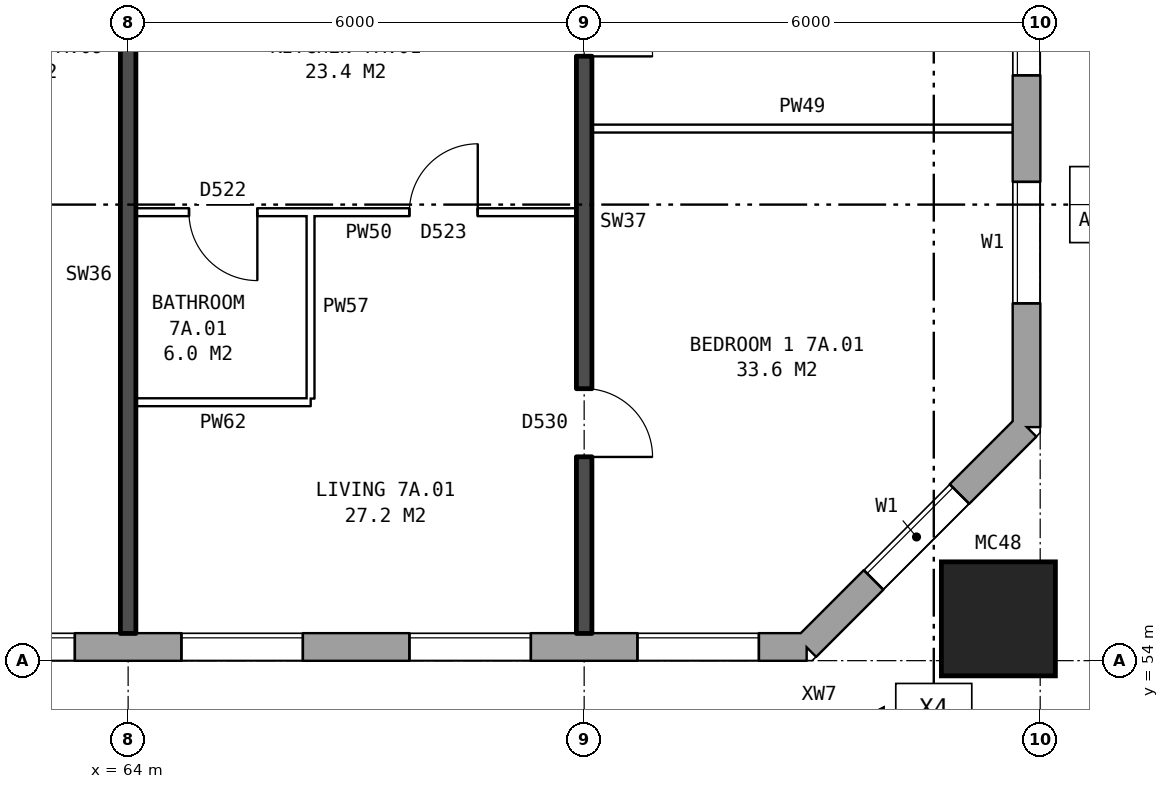
"""IFC4 building model, lengths in metres.
Left out: names, types, materials, properties, quantities, classifications, styles, units other than length and angle.
Written with IfcOpenShell. Run it as: python <this file> out.ifc"""

import sys

from ifc_helpers import new_model, si_unit, direction, frame, frame_2d, origin, origin_2d, place, context, subcontext, project, spatial, rectangle, hollow_rectangle, extrude, element, fill, save


model = new_model("IFC4")
c1 = context("Model", 3, precision=1e-05, world=origin(), true_north=direction((0.0, 1.0)))
c2 = subcontext(c1, "Body", "Model", "MODEL_VIEW")
j1 = project(units=[si_unit("LENGTHUNIT", "METRE"), si_unit("PLANEANGLEUNIT", "RADIAN")], contexts=[c1])
p1 = place(None, origin())
s1 = spatial("IfcSite", under=j1, at=p1, CompositionType="ELEMENT")
p2 = place(p1, origin())
s2 = spatial("IfcBuilding", under=s1, at=p2, CompositionType="ELEMENT")
p3 = place(p2, frame((0.0, 0.0, 28.8)))
s3 = spatial("IfcBuildingStorey", under=s2, at=p3, CompositionType="ELEMENT", Elevation=28.8)
p4 = place(p3, frame((75.45, 54.55, 0.0), z_axis=(0.0, 0.0, 1.0), x_axis=(1.0, 0.0, 0.0)))
e1 = element("IfcColumn", 1, at=p4, inside=s3, PredefinedType="COLUMN", context=c2, shape_type="SweptSolid", body=[
    extrude(hollow_rectangle(XDim=1.5, YDim=1.5, WallThickness=0.08, at=origin_2d()), origin(), (0.0, 0.0, 1.0), 3.1),
])
p5 = place(p3, frame((22.825, 54.18, 0.0), z_axis=(0.0, 0.0, 1.0), x_axis=(1.0, 0.0, 0.0)))
e2 = element("IfcWall", 2, at=p5, inside=s3, PredefinedType="STANDARD", context=c2, shape_type="SweptSolid", body=[
    extrude(rectangle(XDim=50.101, YDim=0.36, at=frame_2d((25.05, 0.0))), origin(), (0.0, 0.0, 1.0), 2.85),
])
p6 = place(p5, frame((2.875, 0.0, 0.8)))
e3 = element("IfcOpeningElement", 3, at=p6, cuts=e2, PredefinedType="OPENING", context=c2, shape_type="SweptSolid", body=[
    extrude(rectangle(XDim=1.6, YDim=1.8, at=frame_2d((0.8, 0.9))), frame((0.0, 0.19, 0.0), z_axis=(0.0, -1.0, 0.0), x_axis=(1.0, 0.0, 0.0)), (0.0, 0.0, 1.0), 0.38),
])
p7 = place(p5, frame((5.875, 0.0, 0.8)))
e4 = element("IfcOpeningElement", 4, at=p7, cuts=e2, PredefinedType="OPENING", context=c2, shape_type="SweptSolid", body=[
    extrude(rectangle(XDim=1.6, YDim=1.8, at=frame_2d((0.8, 0.9))), frame((0.0, 0.19, 0.0), z_axis=(0.0, -1.0, 0.0), x_axis=(1.0, 0.0, 0.0)), (0.0, 0.0, 1.0), 0.38),
])
p8 = place(p5, frame((8.875, 0.0, 0.8)))
e5 = element("IfcOpeningElement", 5, at=p8, cuts=e2, PredefinedType="OPENING", context=c2, shape_type="SweptSolid", body=[
    extrude(rectangle(XDim=1.6, YDim=1.8, at=frame_2d((0.8, 0.9))), frame((0.0, 0.19, 0.0), z_axis=(0.0, -1.0, 0.0), x_axis=(1.0, 0.0, 0.0)), (0.0, 0.0, 1.0), 0.38),
])
p9 = place(p5, frame((11.375, 0.0, 1.0)))
e6 = element("IfcOpeningElement", 6, at=p9, cuts=e2, PredefinedType="OPENING", context=c2, shape_type="SweptSolid", body=[
    extrude(rectangle(XDim=1.0, YDim=1.5, at=frame_2d((0.5, 0.75))), frame((0.0, 0.19, 0.0), z_axis=(0.0, -1.0, 0.0), x_axis=(1.0, 0.0, 0.0)), (0.0, 0.0, 1.0), 0.38),
])
p10 = place(p5, frame((12.675, 0.0, 1.6)))
e7 = element("IfcOpeningElement", 7, at=p10, cuts=e2, PredefinedType="OPENING", context=c2, shape_type="SweptSolid", body=[
    extrude(rectangle(XDim=0.6, YDim=0.9, at=frame_2d((0.3, 0.45))), frame((0.0, 0.19, 0.0), z_axis=(0.0, -1.0, 0.0), x_axis=(1.0, 0.0, 0.0)), (0.0, 0.0, 1.0), 0.38),
])
p11 = place(p5, frame((17.875, 0.0, 0.8)))
e8 = element("IfcOpeningElement", 8, at=p11, cuts=e2, PredefinedType="OPENING", context=c2, shape_type="SweptSolid", body=[
    extrude(rectangle(XDim=1.6, YDim=1.8, at=frame_2d((0.8, 0.9))), frame((0.0, 0.19, 0.0), z_axis=(0.0, -1.0, 0.0), x_axis=(1.0, 0.0, 0.0)), (0.0, 0.0, 1.0), 0.38),
])
p12 = place(p5, frame((20.875, 0.0, 0.8)))
e9 = element("IfcOpeningElement", 9, at=p12, cuts=e2, PredefinedType="OPENING", context=c2, shape_type="SweptSolid", body=[
    extrude(rectangle(XDim=1.6, YDim=1.8, at=frame_2d((0.8, 0.9))), frame((0.0, 0.19, 0.0), z_axis=(0.0, -1.0, 0.0), x_axis=(1.0, 0.0, 0.0)), (0.0, 0.0, 1.0), 0.38),
])
p13 = place(p5, frame((23.875, 0.0, 0.8)))
e10 = element("IfcOpeningElement", 10, at=p13, cuts=e2, PredefinedType="OPENING", context=c2, shape_type="SweptSolid", body=[
    extrude(rectangle(XDim=1.6, YDim=1.8, at=frame_2d((0.8, 0.9))), frame((0.0, 0.19, 0.0), z_axis=(0.0, -1.0, 0.0), x_axis=(1.0, 0.0, 0.0)), (0.0, 0.0, 1.0), 0.38),
])
p14 = place(p5, frame((26.875, 0.0, 0.8)))
e11 = element("IfcOpeningElement", 11, at=p14, cuts=e2, PredefinedType="OPENING", context=c2, shape_type="SweptSolid", body=[
    extrude(rectangle(XDim=1.6, YDim=1.8, at=frame_2d((0.8, 0.9))), frame((0.0, 0.19, 0.0), z_axis=(0.0, -1.0, 0.0), x_axis=(1.0, 0.0, 0.0)), (0.0, 0.0, 1.0), 0.38),
])
p15 = place(p5, frame((29.875, 0.0, 0.8)))
e12 = element("IfcOpeningElement", 12, at=p15, cuts=e2, PredefinedType="OPENING", context=c2, shape_type="SweptSolid", body=[
    extrude(rectangle(XDim=1.6, YDim=1.8, at=frame_2d((0.8, 0.9))), frame((0.0, 0.19, 0.0), z_axis=(0.0, -1.0, 0.0), x_axis=(1.0, 0.0, 0.0)), (0.0, 0.0, 1.0), 0.38),
])
p16 = place(p5, frame((32.375, 0.0, 0.8)))
e13 = element("IfcOpeningElement", 13, at=p16, cuts=e2, PredefinedType="OPENING", context=c2, shape_type="SweptSolid", body=[
    extrude(rectangle(XDim=1.4, YDim=1.8, at=frame_2d((0.7, 0.9))), frame((0.0, 0.19, 0.0), z_axis=(0.0, -1.0, 0.0), x_axis=(1.0, 0.0, 0.0)), (0.0, 0.0, 1.0), 0.38),
])
p17 = place(p5, frame((35.375, 0.0, 0.15)))
e14 = element("IfcOpeningElement", 14, at=p17, cuts=e2, PredefinedType="OPENING", context=c2, shape_type="SweptSolid", body=[
    extrude(rectangle(XDim=0.8, YDim=0.9, at=frame_2d((0.4, 0.45))), frame((0.0, 0.19, 0.0), z_axis=(0.0, -1.0, 0.0), x_axis=(1.0, 0.0, 0.0)), (0.0, 0.0, 1.0), 0.38),
])
p18 = place(p5, frame((38.875, 0.0, 0.8)))
e15 = element("IfcOpeningElement", 15, at=p18, cuts=e2, PredefinedType="OPENING", context=c2, shape_type="SweptSolid", body=[
    extrude(rectangle(XDim=1.6, YDim=1.8, at=frame_2d((0.8, 0.9))), frame((0.0, 0.19, 0.0), z_axis=(0.0, -1.0, 0.0), x_axis=(1.0, 0.0, 0.0)), (0.0, 0.0, 1.0), 0.38),
])
p19 = place(p5, frame((41.875, 0.0, 0.8)))
e16 = element("IfcOpeningElement", 16, at=p19, cuts=e2, PredefinedType="OPENING", context=c2, shape_type="SweptSolid", body=[
    extrude(rectangle(XDim=1.6, YDim=1.8, at=frame_2d((0.8, 0.9))), frame((0.0, 0.19, 0.0), z_axis=(0.0, -1.0, 0.0), x_axis=(1.0, 0.0, 0.0)), (0.0, 0.0, 1.0), 0.38),
])
p20 = place(p5, frame((44.875, 0.0, 0.8)))
e17 = element("IfcOpeningElement", 17, at=p20, cuts=e2, PredefinedType="OPENING", context=c2, shape_type="SweptSolid", body=[
    extrude(rectangle(XDim=1.6, YDim=1.8, at=frame_2d((0.8, 0.9))), frame((0.0, 0.19, 0.0), z_axis=(0.0, -1.0, 0.0), x_axis=(1.0, 0.0, 0.0)), (0.0, 0.0, 1.0), 0.38),
])
p21 = place(p5, frame((47.875, 0.0, 0.8)))
e18 = element("IfcOpeningElement", 18, at=p21, cuts=e2, PredefinedType="OPENING", context=c2, shape_type="SweptSolid", body=[
    extrude(rectangle(XDim=1.6, YDim=1.8, at=frame_2d((0.8, 0.9))), frame((0.0, 0.19, 0.0), z_axis=(0.0, -1.0, 0.0), x_axis=(1.0, 0.0, 0.0)), (0.0, 0.0, 1.0), 0.38),
])
p22 = place(p5, frame((14.825, 0.0, 0.8)))
e19 = element("IfcOpeningElement", 19, at=p22, cuts=e2, PredefinedType="OPENING", context=c2, shape_type="SweptSolid", body=[
    extrude(rectangle(XDim=0.6, YDim=0.9, at=frame_2d((0.3, 0.45))), frame((0.0, 0.19, 0.0), z_axis=(0.0, -1.0, 0.0), x_axis=(1.0, 0.0, 0.0)), (0.0, 0.0, 1.0), 0.38),
])
p23 = place(p5, frame((15.775, 0.0, 0.8)))
e20 = element("IfcOpeningElement", 20, at=p23, cuts=e2, PredefinedType="OPENING", context=c2, shape_type="SweptSolid", body=[
    extrude(rectangle(XDim=1.2, YDim=1.5, at=frame_2d((0.6, 0.75))), frame((0.0, 0.19, 0.0), z_axis=(0.0, -1.0, 0.0), x_axis=(1.0, 0.0, 0.0)), (0.0, 0.0, 1.0), 0.38),
])
p24 = place(p5, frame((34.075, 0.0, 0.8)))
e21 = element("IfcOpeningElement", 21, at=p24, cuts=e2, PredefinedType="OPENING", context=c2, shape_type="SweptSolid", body=[
    extrude(rectangle(XDim=0.6, YDim=1.2, at=frame_2d((0.3, 0.6))), frame((0.0, 0.19, 0.0), z_axis=(0.0, -1.0, 0.0), x_axis=(1.0, 0.0, 0.0)), (0.0, 0.0, 1.0), 0.38),
])
p25 = place(p5, frame((36.725, 0.0, 1.65)))
e22 = element("IfcOpeningElement", 22, at=p25, cuts=e2, PredefinedType="OPENING", context=c2, shape_type="SweptSolid", body=[
    extrude(rectangle(XDim=1.2, YDim=0.9, at=frame_2d((0.6, 0.45))), frame((0.0, 0.19, 0.0), z_axis=(0.0, -1.0, 0.0), x_axis=(1.0, 0.0, 0.0)), (0.0, 0.0, 1.0), 0.38),
])
p26 = place(p3, frame((72.925, 54.18, 0.0), z_axis=(0.0, 0.0, 1.0), x_axis=(0.707106781187, 0.707106781187, 0.0)))
e23 = element("IfcWall", 23, at=p26, inside=s3, PredefinedType="STANDARD", context=c2, shape_type="SweptSolid", body=[
    extrude(rectangle(XDim=4.094, YDim=0.36, at=frame_2d((2.047, 0.0))), origin(), (0.0, 0.0, 1.0), 2.85),
])
p27 = place(p26, frame((1.247, 0.0, 0.8)))
e24 = element("IfcOpeningElement", 24, at=p27, cuts=e23, PredefinedType="OPENING", context=c2, shape_type="SweptSolid", body=[
    extrude(rectangle(XDim=1.6, YDim=1.8, at=frame_2d((0.8, 0.9))), frame((0.0, 0.19, 0.0), z_axis=(0.0, -1.0, 0.0), x_axis=(1.0, 0.0, 0.0)), (0.0, 0.0, 1.0), 0.38),
])
p28 = place(p3, frame((75.82, 57.075, 0.0), z_axis=(0.0, 0.0, 1.0), x_axis=(0.0, 1.0, 0.0)))
e25 = element("IfcWall", 25, at=p28, inside=s3, PredefinedType="STANDARD", context=c2, shape_type="SweptSolid", body=[
    extrude(rectangle(XDim=25.851, YDim=0.36, at=frame_2d((12.925, 0.0))), origin(), (0.0, 0.0, 1.0), 2.85),
])
p29 = place(p28, frame((1.625, 0.0, 0.8)))
e26 = element("IfcOpeningElement", 26, at=p29, cuts=e25, PredefinedType="OPENING", context=c2, shape_type="SweptSolid", body=[
    extrude(rectangle(XDim=1.6, YDim=1.8, at=frame_2d((0.8, 0.9))), frame((0.0, 0.19, 0.0), z_axis=(0.0, -1.0, 0.0), x_axis=(1.0, 0.0, 0.0)), (0.0, 0.0, 1.0), 0.38),
])
p30 = place(p28, frame((4.625, 0.0, 0.8)))
e27 = element("IfcOpeningElement", 27, at=p30, cuts=e25, PredefinedType="OPENING", context=c2, shape_type="SweptSolid", body=[
    extrude(rectangle(XDim=1.6, YDim=1.8, at=frame_2d((0.8, 0.9))), frame((0.0, 0.19, 0.0), z_axis=(0.0, -1.0, 0.0), x_axis=(1.0, 0.0, 0.0)), (0.0, 0.0, 1.0), 0.38),
])
p31 = place(p28, frame((19.625, 0.0, 0.8)))
e28 = element("IfcOpeningElement", 28, at=p31, cuts=e25, PredefinedType="OPENING", context=c2, shape_type="SweptSolid", body=[
    extrude(rectangle(XDim=1.6, YDim=1.8, at=frame_2d((0.8, 0.9))), frame((0.0, 0.19, 0.0), z_axis=(0.0, -1.0, 0.0), x_axis=(1.0, 0.0, 0.0)), (0.0, 0.0, 1.0), 0.38),
])
p32 = place(p28, frame((22.625, 0.0, 0.8)))
e29 = element("IfcOpeningElement", 29, at=p32, cuts=e25, PredefinedType="OPENING", context=c2, shape_type="SweptSolid", body=[
    extrude(rectangle(XDim=1.6, YDim=1.8, at=frame_2d((0.8, 0.9))), frame((0.0, 0.19, 0.0), z_axis=(0.0, -1.0, 0.0), x_axis=(1.0, 0.0, 0.0)), (0.0, 0.0, 1.0), 0.38),
])
p33 = place(p3, frame((64.1, 57.4, 0.0), z_axis=(0.0, 0.0, 1.0), x_axis=(1.0, 0.0, 0.0)))
e30 = element("IfcWall", 30, at=p33, inside=s3, PredefinedType="PARTITIONING", context=c2, shape_type="SweptSolid", body=[
    extrude(rectangle(XDim=2.3, YDim=0.1, at=frame_2d((1.15, 0.0))), origin(), (0.0, 0.0, 1.0), 2.85),
])
p34 = place(p3, frame((64.1, 59.9, 0.0), z_axis=(0.0, 0.0, 1.0), x_axis=(1.0, 0.0, 0.0)))
e31 = element("IfcWall", 31, at=p34, inside=s3, PredefinedType="PARTITIONING", context=c2, shape_type="SweptSolid", body=[
    extrude(rectangle(XDim=5.8, YDim=0.1, at=frame_2d((2.9, 0.0))), origin(), (0.0, 0.0, 1.0), 2.85),
])
p35 = place(p34, frame((3.6, 0.0, 0.0)))
e32 = element("IfcOpeningElement", 32, at=p35, cuts=e31, PredefinedType="OPENING", context=c2, shape_type="SweptSolid", body=[
    extrude(rectangle(XDim=0.9, YDim=2.1, at=frame_2d((0.45, 1.05))), frame((0.0, 0.06, 0.0), z_axis=(0.0, -1.0, 0.0), x_axis=(1.0, 0.0, 0.0)), (0.0, 0.0, 1.0), 0.12),
])
p36 = place(p34, frame((0.7, 0.0, 0.0)))
e33 = element("IfcOpeningElement", 33, at=p36, cuts=e31, PredefinedType="OPENING", context=c2, shape_type="SweptSolid", body=[
    extrude(rectangle(XDim=0.9, YDim=2.1, at=frame_2d((0.45, 1.05))), frame((0.0, 0.06, 0.0), z_axis=(0.0, -1.0, 0.0), x_axis=(1.0, 0.0, 0.0)), (0.0, 0.0, 1.0), 0.12),
])
p37 = place(p3, frame((70.1, 61.0, 0.0), z_axis=(0.0, 0.0, 1.0), x_axis=(1.0, 0.0, 0.0)))
e34 = element("IfcWall", 34, at=p37, inside=s3, PredefinedType="PARTITIONING", context=c2, shape_type="SweptSolid", body=[
    extrude(rectangle(XDim=5.54, YDim=0.1, at=frame_2d((2.77, 0.0))), origin(), (0.0, 0.0, 1.0), 2.85),
])
p38 = place(p3, frame((64.0, 54.36, 0.0), z_axis=(0.0, 0.0, 1.0), x_axis=(0.0, 1.0, 0.0)))
e35 = element("IfcWall", 35, at=p38, inside=s3, PredefinedType="SOLIDWALL", context=c2, shape_type="SweptSolid", body=[
    extrude(rectangle(XDim=9.44, YDim=0.2, at=frame_2d((4.72, 0.0))), origin(), (0.0, 0.0, 1.0), 2.85),
])
p39 = place(p3, frame((66.4, 57.45, 0.0), z_axis=(0.0, 0.0, 1.0), x_axis=(0.0, 1.0, 0.0)))
e36 = element("IfcWall", 36, at=p39, inside=s3, PredefinedType="PARTITIONING", context=c2, shape_type="SweptSolid", body=[
    extrude(rectangle(XDim=2.4, YDim=0.1, at=frame_2d((1.2, 0.0))), origin(), (0.0, 0.0, 1.0), 2.85),
])
p40 = place(p3, frame((70.0, 54.36, 0.0), z_axis=(0.0, 0.0, 1.0), x_axis=(0.0, 1.0, 0.0)))
e37 = element("IfcWall", 37, at=p40, inside=s3, PredefinedType="SOLIDWALL", context=c2, shape_type="SweptSolid", body=[
    extrude(rectangle(XDim=9.44, YDim=0.2, at=frame_2d((4.72, 0.0))), origin(), (0.0, 0.0, 1.0), 2.85),
])
p41 = place(p40, frame((2.32, 0.0, 0.0)))
e38 = element("IfcOpeningElement", 38, at=p41, cuts=e37, PredefinedType="OPENING", context=c2, shape_type="SweptSolid", body=[
    extrude(rectangle(XDim=0.9, YDim=2.1, at=frame_2d((0.45, 1.05))), frame((0.0, 0.11, 0.0), z_axis=(0.0, -1.0, 0.0), x_axis=(1.0, 0.0, 0.0)), (0.0, 0.0, 1.0), 0.22),
])
p42 = place(p40, frame((7.59, 0.0, 0.0)))
e39 = element("IfcOpeningElement", 39, at=p42, cuts=e37, PredefinedType="OPENING", context=c2, shape_type="SweptSolid", body=[
    extrude(rectangle(XDim=0.9, YDim=2.1, at=frame_2d((0.45, 1.05))), frame((0.0, 0.11, 0.0), z_axis=(0.0, -1.0, 0.0), x_axis=(1.0, 0.0, 0.0)), (0.0, 0.0, 1.0), 0.22),
])
p43 = place(p18, origin())
e40 = element("IfcWindow", 40, at=p43, inside=s3, PartitioningType="SINGLE_PANEL", PredefinedType="WINDOW", context=c2, shape_type="SweptSolid", body=[
    extrude(rectangle(XDim=1.6, YDim=1.8, at=frame_2d((0.8, 0.9))), frame((0.0, 0.15, 0.0), z_axis=(0.0, -1.0, 0.0), x_axis=(1.0, 0.0, 0.0)), (0.0, 0.0, 1.0), 0.06),
])
fill(e15, e40)
p44 = place(p19, origin())
e41 = element("IfcWindow", 41, at=p44, inside=s3, PartitioningType="SINGLE_PANEL", PredefinedType="WINDOW", context=c2, shape_type="SweptSolid", body=[
    extrude(rectangle(XDim=1.6, YDim=1.8, at=frame_2d((0.8, 0.9))), frame((0.0, 0.15, 0.0), z_axis=(0.0, -1.0, 0.0), x_axis=(1.0, 0.0, 0.0)), (0.0, 0.0, 1.0), 0.06),
])
fill(e16, e41)
p45 = place(p20, origin())
e42 = element("IfcWindow", 42, at=p45, inside=s3, PartitioningType="SINGLE_PANEL", PredefinedType="WINDOW", context=c2, shape_type="SweptSolid", body=[
    extrude(rectangle(XDim=1.6, YDim=1.8, at=frame_2d((0.8, 0.9))), frame((0.0, 0.15, 0.0), z_axis=(0.0, -1.0, 0.0), x_axis=(1.0, 0.0, 0.0)), (0.0, 0.0, 1.0), 0.06),
])
fill(e17, e42)
p46 = place(p21, origin())
e43 = element("IfcWindow", 43, at=p46, inside=s3, PartitioningType="SINGLE_PANEL", PredefinedType="WINDOW", context=c2, shape_type="SweptSolid", body=[
    extrude(rectangle(XDim=1.6, YDim=1.8, at=frame_2d((0.8, 0.9))), frame((0.0, 0.15, 0.0), z_axis=(0.0, -1.0, 0.0), x_axis=(1.0, 0.0, 0.0)), (0.0, 0.0, 1.0), 0.06),
])
fill(e18, e43)
p47 = place(p27, origin())
e44 = element("IfcWindow", 44, at=p47, inside=s3, PartitioningType="SINGLE_PANEL", PredefinedType="WINDOW", context=c2, shape_type="SweptSolid", body=[
    extrude(rectangle(XDim=1.6, YDim=1.8, at=frame_2d((0.8, 0.9))), frame((0.0, 0.15, 0.0), z_axis=(0.0, -1.0, 0.0), x_axis=(1.0, 0.0, 0.0)), (0.0, 0.0, 1.0), 0.06),
])
fill(e24, e44)
p48 = place(p29, origin())
e45 = element("IfcWindow", 45, at=p48, inside=s3, PartitioningType="SINGLE_PANEL", PredefinedType="WINDOW", context=c2, shape_type="SweptSolid", body=[
    extrude(rectangle(XDim=1.6, YDim=1.8, at=frame_2d((0.8, 0.9))), frame((0.0, 0.15, 0.0), z_axis=(0.0, -1.0, 0.0), x_axis=(1.0, 0.0, 0.0)), (0.0, 0.0, 1.0), 0.06),
])
fill(e26, e45)
p49 = place(p30, origin())
e46 = element("IfcWindow", 46, at=p49, inside=s3, PartitioningType="SINGLE_PANEL", PredefinedType="WINDOW", context=c2, shape_type="SweptSolid", body=[
    extrude(rectangle(XDim=1.6, YDim=1.8, at=frame_2d((0.8, 0.9))), frame((0.0, 0.15, 0.0), z_axis=(0.0, -1.0, 0.0), x_axis=(1.0, 0.0, 0.0)), (0.0, 0.0, 1.0), 0.06),
])
fill(e27, e46)
p50 = place(p41, frame((0.9, 0.0, 0.0), z_axis=(0.0, 0.0, 1.0), x_axis=(-1.0, 0.0, 0.0)))
e47 = element("IfcDoor", 47, at=p50, inside=s3, OperationType="SINGLE_SWING_RIGHT", PredefinedType="DOOR", context=c2, shape_type="SweptSolid", body=[
    extrude(rectangle(XDim=0.9, YDim=2.1, at=frame_2d((0.45, 1.05))), frame((0.0, 0.025, 0.0), z_axis=(0.0, -1.0, 0.0), x_axis=(1.0, 0.0, 0.0)), (0.0, 0.0, 1.0), 0.05),
])
fill(e38, e47)
p51 = place(p42, frame((0.9, 0.0, 0.0), z_axis=(0.0, 0.0, 1.0), x_axis=(-1.0, 0.0, 0.0)))
e48 = element("IfcDoor", 48, at=p51, inside=s3, OperationType="SINGLE_SWING_RIGHT", PredefinedType="DOOR", context=c2, shape_type="SweptSolid", body=[
    extrude(rectangle(XDim=0.9, YDim=2.1, at=frame_2d((0.45, 1.05))), frame((0.0, 0.025, 0.0), z_axis=(0.0, -1.0, 0.0), x_axis=(1.0, 0.0, 0.0)), (0.0, 0.0, 1.0), 0.05),
])
fill(e39, e48)
p52 = place(p35, origin())
e49 = element("IfcDoor", 49, at=p52, inside=s3, OperationType="SINGLE_SWING_RIGHT", PredefinedType="DOOR", context=c2, shape_type="SweptSolid", body=[
    extrude(rectangle(XDim=0.9, YDim=2.1, at=frame_2d((0.45, 1.05))), frame((0.0, 0.025, 0.0), z_axis=(0.0, -1.0, 0.0), x_axis=(1.0, 0.0, 0.0)), (0.0, 0.0, 1.0), 0.05),
])
fill(e32, e49)
p53 = place(p36, frame((0.9, 0.0, 0.0), z_axis=(0.0, 0.0, 1.0), x_axis=(-1.0, 0.0, 0.0)))
e50 = element("IfcDoor", 50, at=p53, inside=s3, OperationType="SINGLE_SWING_LEFT", PredefinedType="DOOR", context=c2, shape_type="SweptSolid", body=[
    extrude(rectangle(XDim=0.9, YDim=2.1, at=frame_2d((0.45, 1.05))), frame((0.0, 0.025, 0.0), z_axis=(0.0, -1.0, 0.0), x_axis=(1.0, 0.0, 0.0)), (0.0, 0.0, 1.0), 0.05),
])
fill(e33, e50)
save(model, sys.argv[1])
